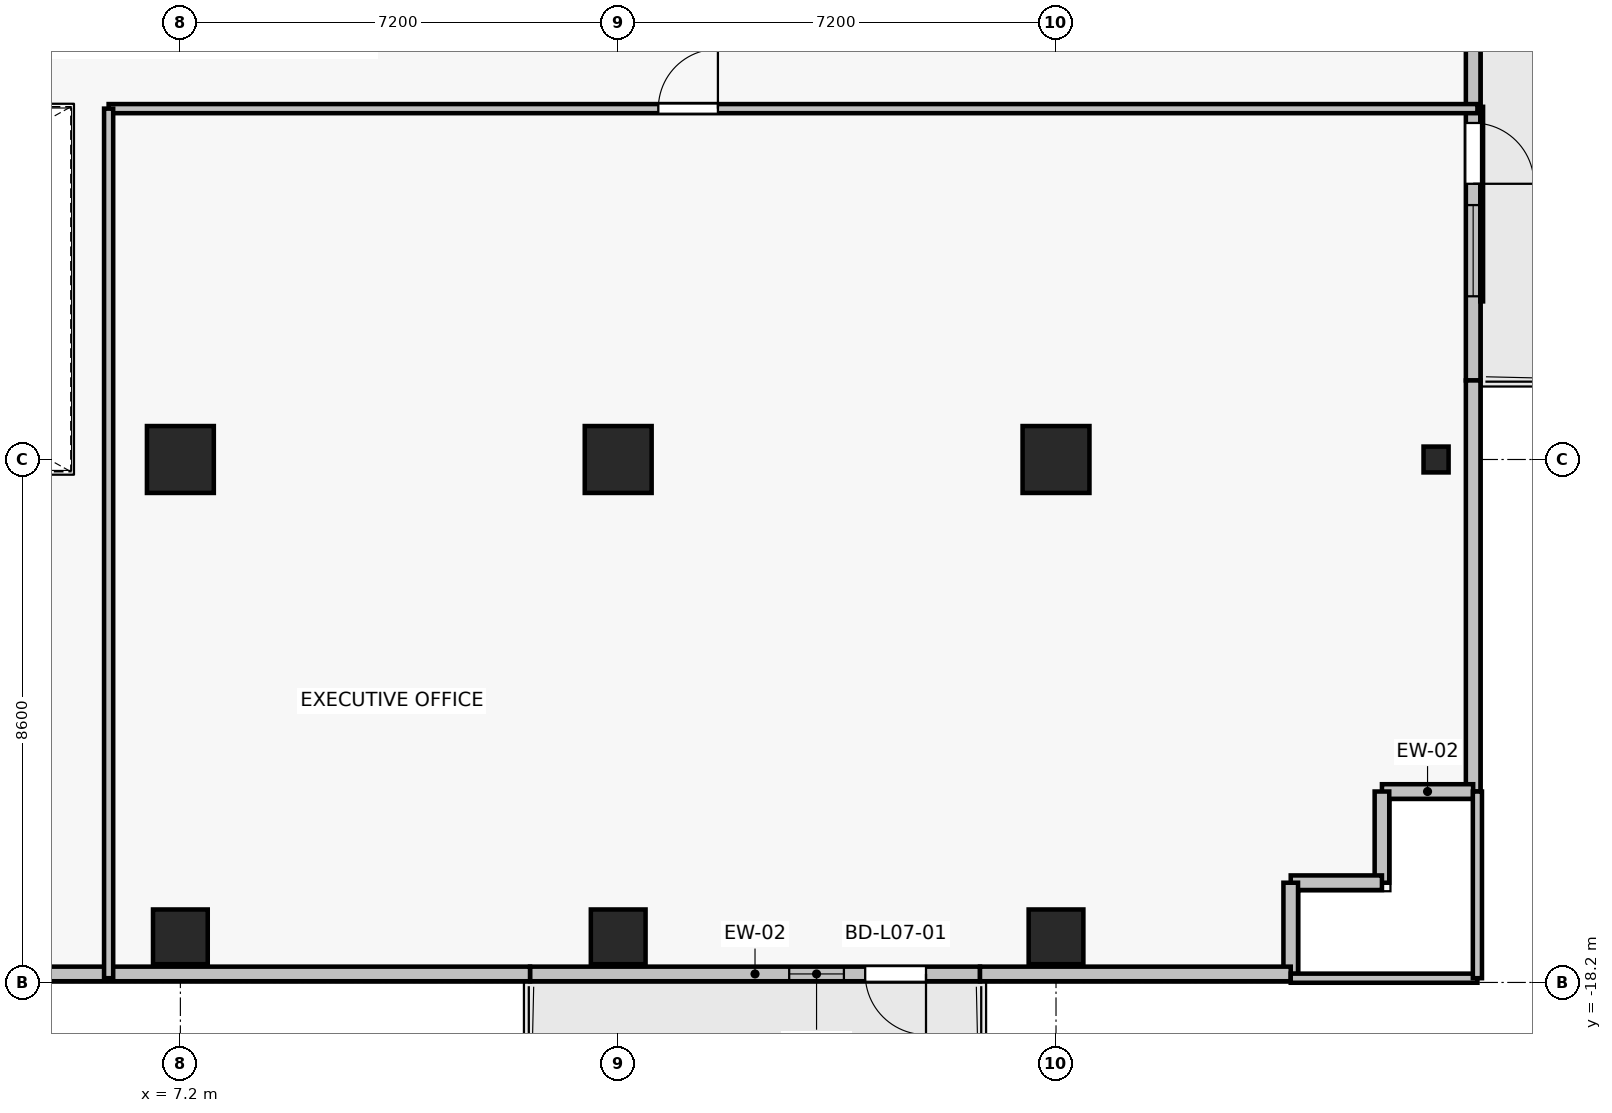
"""IFC4 building model, lengths in metres.
Left out: names, types, materials, properties, quantities, classifications, styles, units other than length and angle.
Written with IfcOpenShell. Run it as: python <this file> out.ifc"""

import sys

from ifc_helpers import new_model, si_unit, direction, frame, frame_2d, origin, origin_2d, place, context, subcontext, project, spatial, rectangle, i_section, extrude, source, transform, mapped, element, fill, save


model = new_model("IFC4")
c1 = context("Model", 3, precision=1e-05, world=origin(), true_north=direction((0.0, 1.0)))
c2 = subcontext(c1, "Body", "Model", "MODEL_VIEW")
j1 = project(units=[si_unit("LENGTHUNIT", "METRE"), si_unit("PLANEANGLEUNIT", "RADIAN")], contexts=[c1])
p1 = place(None, origin())
s1 = spatial("IfcSite", under=j1, at=p1, CompositionType="ELEMENT")
p2 = place(p1, origin())
s2 = spatial("IfcBuilding", under=s1, at=p2, CompositionType="ELEMENT")
p3 = place(p2, frame((0.0, 0.0, 30.7)))
s3 = spatial("IfcBuildingStorey", under=s2, at=p3, CompositionType="ELEMENT", Elevation=30.7)
for number, where, z_axis, x_axis in (
    (1, (7.2, -9.6, 0.0), (0.0, 0.0, 1.0), (1.0, 0.0, 0.0)),
    (2, (14.4, -9.6, 0.0), (0.0, 0.0, 1.0), (1.0, 0.0, 0.0)),
    (3, (21.6, -9.6, 0.0), (0.0, 0.0, 1.0), (1.0, 0.0, 0.0)),
):
    element("IfcColumn", number, at=place(p3, frame(where, z_axis=z_axis, x_axis=x_axis)), inside=s3, PredefinedType="COLUMN", context=c2, shape_type="SweptSolid", body=[
        extrude(rectangle(XDim=1.1, YDim=1.1, at=origin_2d()), origin(), (0.0, 0.0, 1.0), 3.3),
    ])
for number, where, z_axis, x_axis in (
    (4, (7.2, -17.45, 0.0), (0.0, 0.0, 1.0), (1.0, 0.0, 0.0)),
    (5, (14.4, -17.45, 0.0), (0.0, 0.0, 1.0), (1.0, 0.0, 0.0)),
    (6, (21.6, -17.45, 0.0), (0.0, 0.0, 1.0), (1.0, 0.0, 0.0)),
):
    element("IfcColumn", number, at=place(p3, frame(where, z_axis=z_axis, x_axis=x_axis)), inside=s3, PredefinedType="COLUMN", context=c2, shape_type="SweptSolid", body=[
        extrude(rectangle(XDim=0.9, YDim=0.9, at=origin_2d()), origin(), (0.0, 0.0, 1.0), 3.3),
    ])
p4 = place(p3, frame((27.85, -9.6, 0.0), z_axis=(0.0, 0.0, 1.0), x_axis=(1.0, 0.0, 0.0)))
e7 = element("IfcColumn", 7, at=p4, inside=s3, PredefinedType="COLUMN", context=c2, shape_type="SweptSolid", body=[
    extrude(i_section(OverallWidth=0.412, OverallDepth=0.425, WebThickness=0.026, FlangeThickness=0.039, FilletRadius=0.015, at=origin_2d()), origin(), (0.0, 0.0, 1.0), 3.3),
])
p5 = place(p3, frame((20.35, -18.06, 0.0), z_axis=(0.0, 0.0, 1.0), x_axis=(-1.0, 0.0, 0.0)))
e8 = element("IfcWall", 8, at=p5, inside=s3, PredefinedType="SOLIDWALL", context=c2, shape_type="SweptSolid", body=[
    extrude(rectangle(XDim=7.4, YDim=0.24, at=frame_2d((3.7, 0.0))), origin(), (0.0, 0.0, 1.0), 2.665),
])
p6 = place(p5, frame((0.888, 0.0, 0.0)))
e9 = element("IfcOpeningElement", 9, at=p6, cuts=e8, PredefinedType="OPENING", context=c2, shape_type="SweptSolid", body=[
    extrude(rectangle(XDim=1.0, YDim=2.2, at=frame_2d((0.5, 1.1))), frame((0.0, 0.13, 0.0), z_axis=(0.0, -1.0, 0.0), x_axis=(1.0, 0.0, 0.0)), (0.0, 0.0, 1.0), 0.26),
])
p7 = place(p5, frame((2.238, 0.0, 0.85)))
e10 = element("IfcOpeningElement", 10, at=p7, cuts=e8, PredefinedType="OPENING", context=c2, shape_type="SweptSolid", body=[
    extrude(rectangle(XDim=0.9, YDim=1.35, at=frame_2d((0.45, 0.675))), frame((0.0, 0.13, 0.0), z_axis=(0.0, -1.0, 0.0), x_axis=(1.0, 0.0, 0.0)), (0.0, 0.0, 1.0), 0.26),
])
p8 = place(p3, frame((28.46, -2.5, 0.0), z_axis=(0.0, 0.0, 1.0), x_axis=(0.0, -1.0, 0.0)))
e11 = element("IfcWall", 11, at=p8, inside=s3, PredefinedType="SOLIDWALL", context=c2, shape_type="SweptSolid", body=[
    extrude(rectangle(XDim=5.8, YDim=0.24, at=frame_2d((2.9, 0.0))), origin(), (0.0, 0.0, 1.0), 3.075),
])
p9 = place(p8, frame((1.566, 0.0, 0.0)))
e12 = element("IfcOpeningElement", 12, at=p9, cuts=e11, PredefinedType="OPENING", context=c2, shape_type="SweptSolid", body=[
    extrude(rectangle(XDim=1.0, YDim=2.2, at=frame_2d((0.5, 1.1))), frame((0.0, 0.13, 0.0), z_axis=(0.0, -1.0, 0.0), x_axis=(1.0, 0.0, 0.0)), (0.0, 0.0, 1.0), 0.26),
])
p10 = place(p8, frame((2.916, 0.0, 0.85)))
e13 = element("IfcOpeningElement", 13, at=p10, cuts=e11, PredefinedType="OPENING", context=c2, shape_type="SweptSolid", body=[
    extrude(rectangle(XDim=1.5, YDim=1.6, at=frame_2d((0.75, 0.8))), frame((0.0, 0.13, 0.0), z_axis=(0.0, -1.0, 0.0), x_axis=(1.0, 0.0, 0.0)), (0.0, 0.0, 1.0), 0.26),
])
p11 = place(p3, frame((28.46, -15.06, 0.0), z_axis=(0.0, 0.0, 1.0), x_axis=(0.0, 1.0, 0.0)))
e14 = element("IfcWall", 14, at=p11, inside=s3, PredefinedType="SOLIDWALL", context=c2, shape_type="SweptSolid", body=[
    extrude(rectangle(XDim=6.76, YDim=0.24, at=frame_2d((3.38, 0.0))), origin(), (0.0, 0.0, 1.0), 3.075),
])
for number, where, z_axis, x_axis in (
    (15, (26.96, -15.06, 0.0), (0.0, 0.0, 1.0), (1.0, 0.0, 0.0)),
    (16, (26.96, -16.56, 0.0), (0.0, 0.0, 1.0), (0.0, 1.0, 0.0)),
    (17, (25.46, -16.56, 0.0), (0.0, 0.0, 1.0), (1.0, 0.0, 0.0)),
    (18, (25.46, -18.06, 0.0), (0.0, 0.0, 1.0), (0.0, 1.0, 0.0)),
):
    element("IfcWall", number, at=place(p3, frame(where, z_axis=z_axis, x_axis=x_axis)), inside=s3, PredefinedType="SOLIDWALL", context=c2, shape_type="SweptSolid", body=[
        extrude(rectangle(XDim=1.5, YDim=0.24, at=frame_2d((0.75, 0.0))), origin(), (0.0, 0.0, 1.0), 3.075),
    ])
p12 = place(p3, frame((20.35, -18.06, 0.0), z_axis=(0.0, 0.0, 1.0), x_axis=(1.0, 0.0, 0.0)))
e19 = element("IfcWall", 19, at=p12, inside=s3, PredefinedType="SOLIDWALL", context=c2, shape_type="SweptSolid", body=[
    extrude(rectangle(XDim=5.11, YDim=0.24, at=frame_2d((2.555, 0.0))), origin(), (0.0, 0.0, 1.0), 3.075),
])
p13 = place(p3, frame((3.34, -18.06, 0.0), z_axis=(0.0, 0.0, 1.0), x_axis=(1.0, 0.0, 0.0)))
e20 = element("IfcWall", 20, at=p13, inside=s3, PredefinedType="SOLIDWALL", context=c2, shape_type="SweptSolid", body=[
    extrude(rectangle(XDim=9.61, YDim=0.24, at=frame_2d((4.805, 0.0))), origin(), (0.0, 0.0, 1.0), 2.665),
])
p14 = place(p3, frame((28.53, -18.13, 0.0), z_axis=(0.0, 0.0, 1.0), x_axis=(-1.0, 0.0, 0.0)))
e21 = element("IfcWall", 21, at=p14, inside=s3, PredefinedType="PARTITIONING", context=c2, shape_type="SweptSolid", body=[
    extrude(rectangle(XDim=3.07, YDim=0.15, at=frame_2d((1.535, 0.0))), origin(), (0.0, 0.0, 1.0), 2.665),
])
p15 = place(p3, frame((6.02, -3.83, 0.0), z_axis=(0.0, 0.0, 1.0), x_axis=(1.0, 0.0, 0.0)))
e22 = element("IfcWall", 22, at=p15, inside=s3, PredefinedType="PARTITIONING", context=c2, shape_type="SweptSolid", body=[
    extrude(rectangle(XDim=22.51, YDim=0.15, at=frame_2d((11.255, 0.0))), origin(), (0.0, 0.0, 1.0), 2.465),
])
p16 = place(p15, frame((9.04, 0.0, 0.0)))
e23 = element("IfcOpeningElement", 23, at=p16, cuts=e22, PredefinedType="OPENING", context=c2, shape_type="SweptSolid", body=[
    extrude(rectangle(XDim=0.98, YDim=2.15, at=frame_2d((0.49, 1.075))), frame((0.0, 0.085, 0.0), z_axis=(0.0, -1.0, 0.0), x_axis=(1.0, 0.0, 0.0)), (0.0, 0.0, 1.0), 0.17),
])
p17 = place(p3, frame((6.02, -18.13, 0.0), z_axis=(0.0, 0.0, 1.0), x_axis=(0.0, 1.0, 0.0)))
e24 = element("IfcWall", 24, at=p17, inside=s3, PredefinedType="PARTITIONING", context=c2, shape_type="SweptSolid", body=[
    extrude(rectangle(XDim=14.3, YDim=0.15, at=frame_2d((7.15, 0.0))), origin(), (0.0, 0.0, 1.0), 2.465),
])
p18 = place(p3, frame((28.53, -15.06, 0.0), z_axis=(0.0, 0.0, 1.0), x_axis=(0.0, -1.0, 0.0)))
e25 = element("IfcWall", 25, at=p18, inside=s3, PredefinedType="PARTITIONING", context=c2, shape_type="SweptSolid", body=[
    extrude(rectangle(XDim=3.07, YDim=0.15, at=frame_2d((1.535, 0.0))), origin(), (0.0, 0.0, 1.0), 3.075),
])
m1 = source(origin(), c2, "Body", "SweptSolid", [
    extrude(rectangle(XDim=1.0, YDim=2.2, at=frame_2d((0.5, 1.1))), frame((0.0, 0.025, 0.0), z_axis=(0.0, -1.0, 0.0), x_axis=(1.0, 0.0, 0.0)), (0.0, 0.0, 1.0), 0.05),
])
p19 = place(p6, origin())
e26 = element("IfcDoor", 26, at=p19, inside=s3, OperationType="SINGLE_SWING_LEFT", PredefinedType="DOOR", context=c2, shape_type="MappedRepresentation", body=[
    mapped(m1, transform((0.0, 0.0, 0.0), x_axis=(1.0, 0.0, 0.0), y_axis=(0.0, 1.0, 0.0), z_axis=(0.0, 0.0, 1.0), scale=1.0)),
])
fill(e9, e26)
m2 = source(origin(), c2, "Body", "SweptSolid", [
    extrude(rectangle(XDim=0.9, YDim=1.35, at=frame_2d((0.45, 0.675))), frame((0.0, 0.03, 0.0), z_axis=(0.0, -1.0, 0.0), x_axis=(1.0, 0.0, 0.0)), (0.0, 0.0, 1.0), 0.06),
])
p20 = place(p7, origin())
e27 = element("IfcWindow", 27, at=p20, inside=s3, PartitioningType="SINGLE_PANEL", PredefinedType="WINDOW", context=c2, shape_type="MappedRepresentation", body=[
    mapped(m2, transform((0.0, 0.0, 0.0), x_axis=(1.0, 0.0, 0.0), y_axis=(0.0, 1.0, 0.0), z_axis=(0.0, 0.0, 1.0), scale=1.0)),
])
fill(e10, e27)
p21 = place(p9, origin())
e28 = element("IfcDoor", 28, at=p21, inside=s3, OperationType="SINGLE_SWING_RIGHT", PredefinedType="DOOR", context=c2, shape_type="MappedRepresentation", body=[
    mapped(m1, transform((0.0, 0.0, 0.0), x_axis=(1.0, 0.0, 0.0), y_axis=(0.0, 1.0, 0.0), z_axis=(0.0, 0.0, 1.0), scale=1.0)),
])
fill(e12, e28)
m3 = source(origin(), c2, "Body", "SweptSolid", [
    extrude(rectangle(XDim=1.5, YDim=1.6, at=frame_2d((0.75, 0.8))), frame((0.0, 0.03, 0.0), z_axis=(0.0, -1.0, 0.0), x_axis=(1.0, 0.0, 0.0)), (0.0, 0.0, 1.0), 0.06),
])
p22 = place(p10, origin())
e29 = element("IfcWindow", 29, at=p22, inside=s3, PartitioningType="SINGLE_PANEL", PredefinedType="WINDOW", context=c2, shape_type="MappedRepresentation", body=[
    mapped(m3, transform((0.0, 0.0, 0.0), x_axis=(1.0, 0.0, 0.0), y_axis=(0.0, 1.0, 0.0), z_axis=(0.0, 0.0, 1.0), scale=1.0)),
])
fill(e13, e29)
m4 = source(origin(), c2, "Body", "SweptSolid", [
    extrude(rectangle(XDim=0.98, YDim=2.15, at=frame_2d((0.49, 1.075))), frame((0.0, 0.025, 0.0), z_axis=(0.0, -1.0, 0.0), x_axis=(1.0, 0.0, 0.0)), (0.0, 0.0, 1.0), 0.05),
])
p23 = place(p16, origin())
e30 = element("IfcDoor", 30, at=p23, inside=s3, OperationType="SINGLE_SWING_RIGHT", PredefinedType="DOOR", context=c2, shape_type="MappedRepresentation", body=[
    mapped(m4, transform((0.0, 0.0, 0.0), x_axis=(1.0, 0.0, 0.0), y_axis=(0.0, 1.0, 0.0), z_axis=(0.0, 0.0, 1.0), scale=1.0)),
])
fill(e23, e30)
save(model, sys.argv[1])
